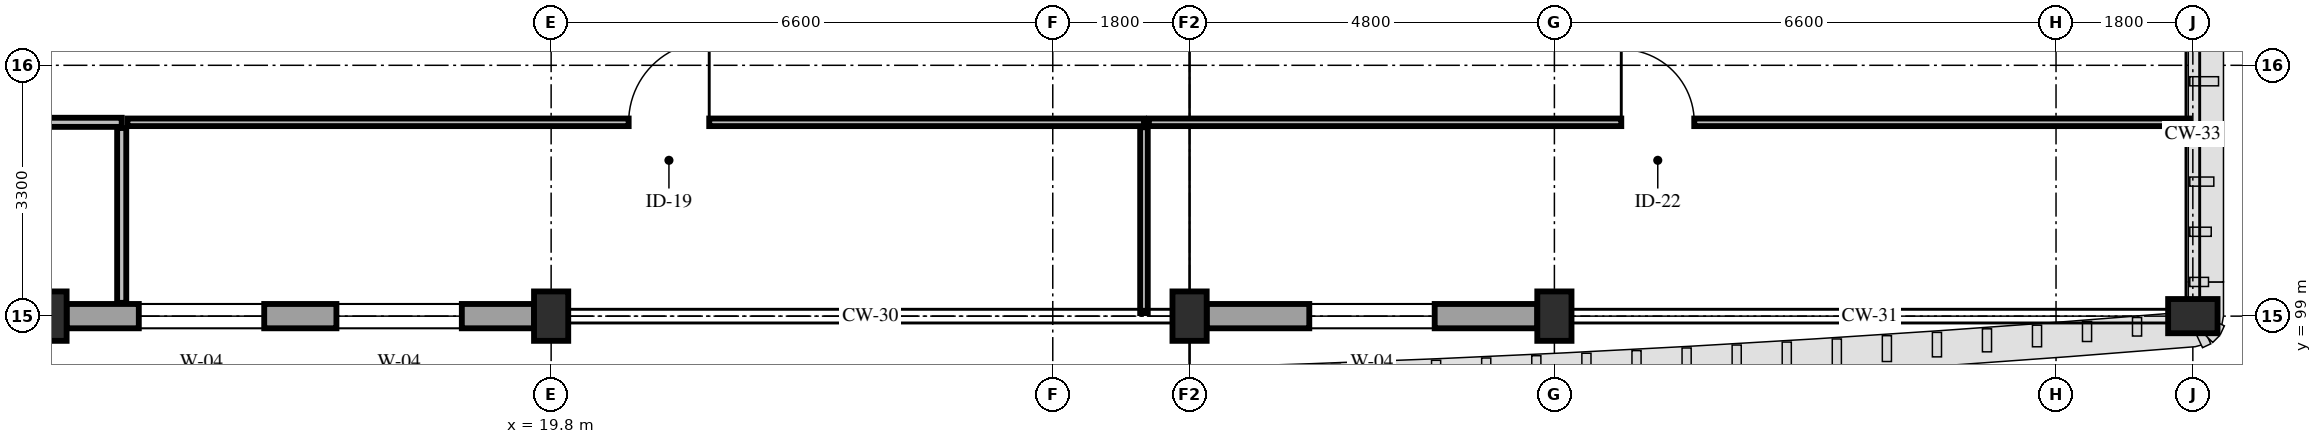
"""IFC4 building model, lengths in metres.
Left out: names, types, materials, properties, quantities, classifications, styles, units other than length and angle.
Written with IfcOpenShell. Run it as: python <this file> out.ifc"""

import sys

from ifc_helpers import new_model, si_unit, direction, frame, frame_2d, origin, origin_2d, place, context, subcontext, project, spatial, rectangle, extrude, element, fill, save


model = new_model("IFC4")
c1 = context("Model", 3, precision=1e-05, world=origin(), true_north=direction((0.0, 1.0)))
c2 = subcontext(c1, "Body", "Model", "MODEL_VIEW")
j1 = project(units=[si_unit("LENGTHUNIT", "METRE"), si_unit("PLANEANGLEUNIT", "RADIAN")], contexts=[c1])
p1 = place(None, origin())
s1 = spatial("IfcSite", under=j1, at=p1, CompositionType="ELEMENT")
p2 = place(p1, origin())
s2 = spatial("IfcBuilding", under=s1, at=p2, CompositionType="ELEMENT")
p3 = place(p2, frame((0.0, 0.0, 24.6)))
s3 = spatial("IfcBuildingStorey", under=s2, at=p3, CompositionType="ELEMENT", Elevation=24.6)
for number, where, z_axis, x_axis in (
    (1, (13.2, 99.0, 0.0), (0.0, 0.0, 1.0), (1.0, 0.0, 0.0)),
    (2, (19.8, 99.0, 0.0), (0.0, 0.0, 1.0), (1.0, 0.0, 0.0)),
    (3, (28.2, 99.0, 0.0), (0.0, 0.0, 1.0), (1.0, 0.0, 0.0)),
    (4, (33.0, 99.0, 0.0), (0.0, 0.0, 1.0), (1.0, 0.0, 0.0)),
    (5, (41.4, 99.0, 0.0), (0.0, 0.0, 1.0), (0.0, 1.0, 0.0)),
):
    element("IfcColumn", number, at=place(p3, frame(where, z_axis=z_axis, x_axis=x_axis)), inside=s3, PredefinedType="PILASTER", context=c2, shape_type="SweptSolid", body=[
        extrude(rectangle(XDim=0.45, YDim=0.65, at=origin_2d()), origin(), (0.0, 0.0, 1.0), 4.8),
    ])
p4 = place(p3, frame((32.775, 99.0, 0.0), z_axis=(0.0, 0.0, 1.0), x_axis=(-1.0, 0.0, 0.0)))
e6 = element("IfcWall", 6, at=p4, inside=s3, PredefinedType="STANDARD", context=c2, shape_type="SweptSolid", body=[
    extrude(rectangle(XDim=4.35, YDim=0.32, at=frame_2d((2.175, 0.0))), origin(), (0.0, 0.0, 1.0), 3.95),
])
p5 = place(p4, frame((1.35, 0.0, 0.85)))
e7 = element("IfcOpeningElement", 7, at=p5, cuts=e6, PredefinedType="OPENING", context=c2, shape_type="SweptSolid", body=[
    extrude(rectangle(XDim=1.65, YDim=1.66, at=frame_2d((0.825, 0.83))), frame((0.0, 0.175, 0.0), z_axis=(0.0, -1.0, 0.0), x_axis=(1.0, 0.0, 0.0)), (0.0, 0.0, 1.0), 0.35),
])
p6 = place(p3, frame((19.575, 99.0, 0.0), z_axis=(0.0, 0.0, 1.0), x_axis=(-1.0, 0.0, 0.0)))
e8 = element("IfcWall", 8, at=p6, inside=s3, PredefinedType="STANDARD", context=c2, shape_type="SweptSolid", body=[
    extrude(rectangle(XDim=6.15, YDim=0.32, at=frame_2d((3.075, 0.0))), origin(), (0.0, 0.0, 1.0), 3.93),
])
p7 = place(p6, frame((0.95, 0.0, 0.85)))
e9 = element("IfcOpeningElement", 9, at=p7, cuts=e8, PredefinedType="OPENING", context=c2, shape_type="SweptSolid", body=[
    extrude(rectangle(XDim=1.65, YDim=1.66, at=frame_2d((0.825, 0.83))), frame((0.0, 0.175, 0.0), z_axis=(0.0, -1.0, 0.0), x_axis=(1.0, 0.0, 0.0)), (0.0, 0.0, 1.0), 0.35),
])
p8 = place(p6, frame((3.55, 0.0, 0.85)))
e10 = element("IfcOpeningElement", 10, at=p8, cuts=e8, PredefinedType="OPENING", context=c2, shape_type="SweptSolid", body=[
    extrude(rectangle(XDim=1.65, YDim=1.66, at=frame_2d((0.825, 0.83))), frame((0.0, 0.175, 0.0), z_axis=(0.0, -1.0, 0.0), x_axis=(1.0, 0.0, 0.0)), (0.0, 0.0, 1.0), 0.35),
])
p9 = place(p3, frame((4.865, 101.55, 0.0), z_axis=(0.0, 0.0, 1.0), x_axis=(1.0, 0.0, 0.0)))
e11 = element("IfcWall", 11, at=p9, inside=s3, PredefinedType="PARTITIONING", context=c2, shape_type="SweptSolid", body=[
    extrude(rectangle(XDim=9.285, YDim=0.12, at=frame_2d((4.643, 0.0))), origin(), (0.0, 0.0, 1.0), 4.13),
])
p10 = place(p9, frame((3.975, 0.0, 0.0)))
e12 = element("IfcOpeningElement", 12, at=p10, cuts=e11, PredefinedType="OPENING", context=c2, shape_type="SweptSolid", body=[
    extrude(rectangle(XDim=1.26, YDim=2.2, at=frame_2d((0.63, 1.1))), frame((0.0, 0.075, 0.0), z_axis=(0.0, -1.0, 0.0), x_axis=(1.0, 0.0, 0.0)), (0.0, 0.0, 1.0), 0.15),
])
p11 = place(p3, frame((14.15, 99.175, 0.0), z_axis=(0.0, 0.0, 1.0), x_axis=(0.0, 1.0, 0.0)))
e13 = element("IfcWall", 13, at=p11, inside=s3, PredefinedType="PARTITIONING", context=c2, shape_type="SweptSolid", body=[
    extrude(rectangle(XDim=2.3, YDim=0.12, at=frame_2d((1.15, 0.0))), origin(), (0.0, 0.0, 1.0), 3.93),
])
p12 = place(p3, frame((14.225, 101.55, 0.0), z_axis=(0.0, 0.0, 1.0), x_axis=(1.0, 0.0, 0.0)))
e14 = element("IfcWall", 14, at=p12, inside=s3, PredefinedType="PARTITIONING", context=c2, shape_type="SweptSolid", body=[
    extrude(rectangle(XDim=13.375, YDim=0.1, at=frame_2d((6.688, 0.0))), origin(), (0.0, 0.0, 1.0), 4.13),
])
p13 = place(p12, frame((6.595, 0.0, 0.0)))
e15 = element("IfcOpeningElement", 15, at=p13, cuts=e14, PredefinedType="OPENING", context=c2, shape_type="SweptSolid", body=[
    extrude(rectangle(XDim=1.06, YDim=2.2, at=frame_2d((0.53, 1.1))), frame((0.0, 0.065, 0.0), z_axis=(0.0, -1.0, 0.0), x_axis=(1.0, 0.0, 0.0)), (0.0, 0.0, 1.0), 0.13),
])
p14 = place(p3, frame((27.6, 99.04, 0.0), z_axis=(0.0, 0.0, 1.0), x_axis=(0.0, 1.0, 0.0)))
e16 = element("IfcWall", 16, at=p14, inside=s3, PredefinedType="PARTITIONING", context=c2, shape_type="SweptSolid", body=[
    extrude(rectangle(XDim=2.445, YDim=0.1, at=frame_2d((1.223, 0.0))), origin(), (0.0, 0.0, 1.0), 3.93),
])
p15 = place(p3, frame((27.665, 101.55, 0.0), z_axis=(0.0, 0.0, 1.0), x_axis=(1.0, 0.0, 0.0)))
e17 = element("IfcWall", 17, at=p15, inside=s3, PredefinedType="PARTITIONING", context=c2, shape_type="SweptSolid", body=[
    extrude(rectangle(XDim=13.695, YDim=0.1, at=frame_2d((6.848, 0.0))), origin(), (0.0, 0.0, 1.0), 4.08),
])
p16 = place(p15, frame((6.215, 0.0, 0.0)))
e18 = element("IfcOpeningElement", 18, at=p16, cuts=e17, PredefinedType="OPENING", context=c2, shape_type="SweptSolid", body=[
    extrude(rectangle(XDim=0.96, YDim=2.15, at=frame_2d((0.48, 1.075))), frame((0.0, 0.065, 0.0), z_axis=(0.0, -1.0, 0.0), x_axis=(1.0, 0.0, 0.0)), (0.0, 0.0, 1.0), 0.13),
])
p17 = place(p5, origin())
e19 = element("IfcWindow", 19, at=p17, inside=s3, PartitioningType="SINGLE_PANEL", PredefinedType="WINDOW", context=c2, shape_type="SweptSolid", body=[
    extrude(rectangle(XDim=1.65, YDim=1.66, at=frame_2d((0.825, 0.83))), frame((0.0, 0.03, 0.0), z_axis=(0.0, -1.0, 0.0), x_axis=(1.0, 0.0, 0.0)), (0.0, 0.0, 1.0), 0.06),
])
fill(e7, e19)
p18 = place(p7, origin())
e20 = element("IfcWindow", 20, at=p18, inside=s3, PartitioningType="SINGLE_PANEL", PredefinedType="WINDOW", context=c2, shape_type="SweptSolid", body=[
    extrude(rectangle(XDim=1.65, YDim=1.66, at=frame_2d((0.825, 0.83))), frame((0.0, 0.03, 0.0), z_axis=(0.0, -1.0, 0.0), x_axis=(1.0, 0.0, 0.0)), (0.0, 0.0, 1.0), 0.06),
])
fill(e9, e20)
p19 = place(p8, origin())
e21 = element("IfcWindow", 21, at=p19, inside=s3, PartitioningType="SINGLE_PANEL", PredefinedType="WINDOW", context=c2, shape_type="SweptSolid", body=[
    extrude(rectangle(XDim=1.65, YDim=1.66, at=frame_2d((0.825, 0.83))), frame((0.0, 0.03, 0.0), z_axis=(0.0, -1.0, 0.0), x_axis=(1.0, 0.0, 0.0)), (0.0, 0.0, 1.0), 0.06),
])
fill(e10, e21)
p20 = place(p13, origin())
e22 = element("IfcDoor", 22, at=p20, inside=s3, OperationType="SINGLE_SWING_RIGHT", PredefinedType="DOOR", context=c2, shape_type="SweptSolid", body=[
    extrude(rectangle(XDim=1.06, YDim=2.2, at=frame_2d((0.53, 1.1))), frame((0.0, 0.025, 0.0), z_axis=(0.0, -1.0, 0.0), x_axis=(1.0, 0.0, 0.0)), (0.0, 0.0, 1.0), 0.05),
])
fill(e15, e22)
p21 = place(p16, origin())
e23 = element("IfcDoor", 23, at=p21, inside=s3, OperationType="SINGLE_SWING_LEFT", PredefinedType="DOOR", context=c2, shape_type="SweptSolid", body=[
    extrude(rectangle(XDim=0.96, YDim=2.15, at=frame_2d((0.48, 1.075))), frame((0.0, 0.025, 0.0), z_axis=(0.0, -1.0, 0.0), x_axis=(1.0, 0.0, 0.0)), (0.0, 0.0, 1.0), 0.05),
])
fill(e18, e23)
save(model, sys.argv[1])
